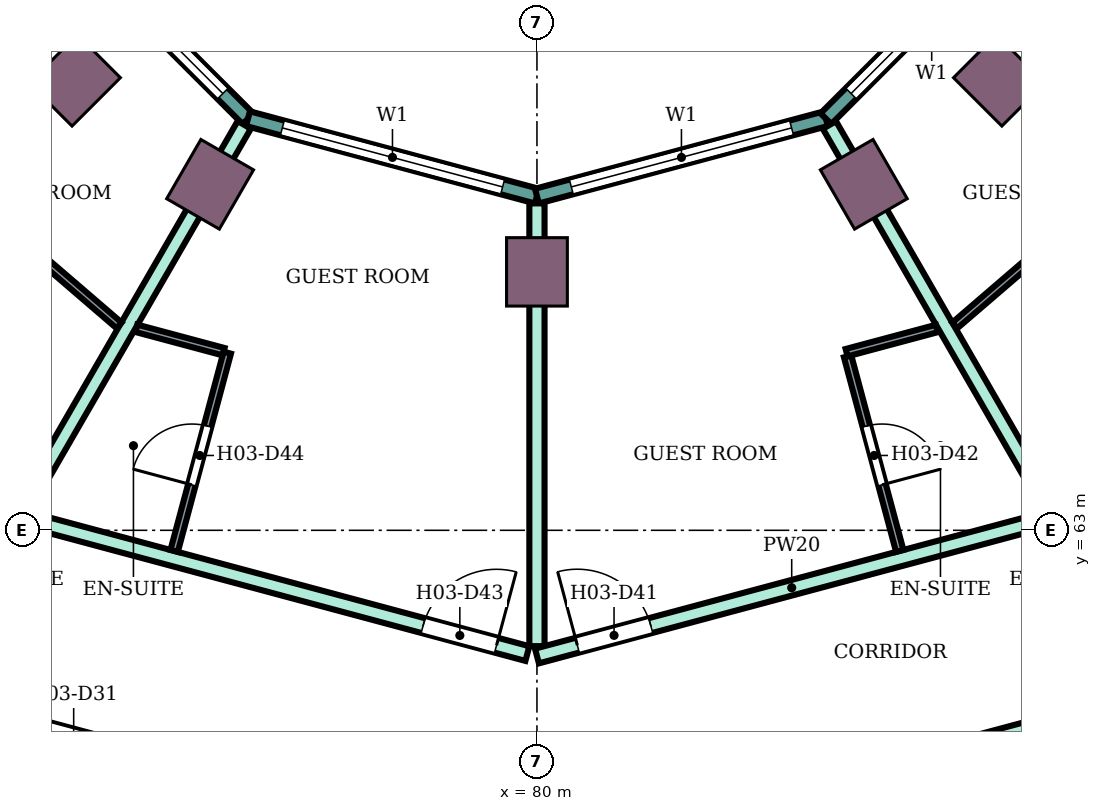
"""IFC4 building model, lengths in metres.
Left out: names, types, materials, properties, quantities, classifications, styles, units other than length and angle.
Written with IfcOpenShell. Run it as: python <this file> out.ifc"""

import sys

from ifc_helpers import new_model, si_unit, direction, frame, frame_2d, origin, origin_2d, place, context, subcontext, project, spatial, rectangle, extrude, element, fill, save


model = new_model("IFC4")
c1 = context("Model", 3, precision=1e-05, world=origin(), true_north=direction((0.0, 1.0)))
c2 = subcontext(c1, "Body", "Model", "MODEL_VIEW")
j1 = project(units=[si_unit("LENGTHUNIT", "METRE"), si_unit("PLANEANGLEUNIT", "RADIAN")], contexts=[c1])
p1 = place(None, origin())
s1 = spatial("IfcSite", under=j1, at=p1, CompositionType="ELEMENT")
p2 = place(p1, origin())
s2 = spatial("IfcBuilding", under=s1, at=p2, CompositionType="ELEMENT")
p3 = place(p2, frame((0.0, 0.0, 55.4)))
s3 = spatial("IfcBuildingStorey", under=s2, at=p3, CompositionType="ELEMENT", Elevation=55.4)
for number, where, z_axis, x_axis in (
    (1, (73.919, 68.919, 0.0), (0.0, 0.0, 1.0), (-0.707, -0.707, 0.0)),
    (2, (75.7, 67.552, 0.0), (0.0, 0.0, 1.0), (-0.5, -0.866, 0.0)),
    (3, (80.0, 66.4, 0.0), (0.0, 0.0, 1.0), (0.0, -1.0, 0.0)),
    (4, (84.3, 67.552, 0.0), (0.0, 0.0, 1.0), (0.5, -0.866, 0.0)),
    (5, (86.081, 68.919, 0.0), (0.0, 0.0, 1.0), (0.707, -0.707, 0.0)),
):
    element("IfcColumn", number, at=place(p3, frame(where, z_axis=z_axis, x_axis=x_axis)), inside=s3, PredefinedType="COLUMN", context=c2, shape_type="SweptSolid", body=[
        extrude(rectangle(XDim=0.9, YDim=0.8, at=origin_2d()), origin(), (0.0, 0.0, 1.0), 3.8),
    ])
p4 = place(p3, frame((73.415, 71.198, 0.0), z_axis=(0.0, 0.0, 1.0), x_axis=(0.707106781187, -0.707106781187, 0.0)))
e6 = element("IfcWall", 6, at=p4, inside=s3, PredefinedType="NOTDEFINED", context=c2, shape_type="SweptSolid", body=[
    extrude(rectangle(XDim=3.936, YDim=0.2, at=frame_2d((1.968, 0.0))), origin(), (0.0, 0.0, 1.0), 3.8),
])
p5 = place(p4, frame((0.468, 0.0, 0.9)))
e7 = element("IfcOpeningElement", 7, at=p5, cuts=e6, PredefinedType="OPENING", context=c2, shape_type="SweptSolid", body=[
    extrude(rectangle(XDim=3.0, YDim=2.3, at=frame_2d((1.5, 1.15))), frame((0.0, 0.11, 0.0), z_axis=(0.0, -1.0, 0.0), x_axis=(1.0, 0.0, 0.0)), (0.0, 0.0, 1.0), 0.22),
])
p6 = place(p3, frame((76.198, 68.415, 0.0), z_axis=(0.0, 0.0, 1.0), x_axis=(0.965933654434, -0.258789828301, 0.0)))
e8 = element("IfcWall", 8, at=p6, inside=s3, PredefinedType="NOTDEFINED", context=c2, shape_type="SweptSolid", body=[
    extrude(rectangle(XDim=3.936, YDim=0.2, at=frame_2d((1.968, 0.0))), origin(), (0.0, 0.0, 1.0), 3.8),
])
p7 = place(p6, frame((0.468, 0.0, 0.9)))
e9 = element("IfcOpeningElement", 9, at=p7, cuts=e8, PredefinedType="OPENING", context=c2, shape_type="SweptSolid", body=[
    extrude(rectangle(XDim=3.0, YDim=2.3, at=frame_2d((1.5, 1.15))), frame((0.0, 0.11, 0.0), z_axis=(0.0, -1.0, 0.0), x_axis=(1.0, 0.0, 0.0)), (0.0, 0.0, 1.0), 0.22),
])
p8 = place(p3, frame((80.0, 67.396, 0.0), z_axis=(0.0, 0.0, 1.0), x_axis=(0.965933654434, 0.258789828301, 0.0)))
e10 = element("IfcWall", 10, at=p8, inside=s3, PredefinedType="NOTDEFINED", context=c2, shape_type="SweptSolid", body=[
    extrude(rectangle(XDim=3.936, YDim=0.2, at=frame_2d((1.968, 0.0))), origin(), (0.0, 0.0, 1.0), 3.8),
])
p9 = place(p8, frame((0.468, 0.0, 0.9)))
e11 = element("IfcOpeningElement", 11, at=p9, cuts=e10, PredefinedType="OPENING", context=c2, shape_type="SweptSolid", body=[
    extrude(rectangle(XDim=3.0, YDim=2.3, at=frame_2d((1.5, 1.15))), frame((0.0, 0.11, 0.0), z_axis=(0.0, -1.0, 0.0), x_axis=(1.0, 0.0, 0.0)), (0.0, 0.0, 1.0), 0.22),
])
p10 = place(p3, frame((83.802, 68.415, 0.0), z_axis=(0.0, 0.0, 1.0), x_axis=(0.707106781187, 0.707106781187, 0.0)))
e12 = element("IfcWall", 12, at=p10, inside=s3, PredefinedType="NOTDEFINED", context=c2, shape_type="SweptSolid", body=[
    extrude(rectangle(XDim=3.936, YDim=0.2, at=frame_2d((1.968, 0.0))), origin(), (0.0, 0.0, 1.0), 3.8),
])
p11 = place(p10, frame((0.468, 0.0, 0.9)))
e13 = element("IfcOpeningElement", 13, at=p11, cuts=e12, PredefinedType="OPENING", context=c2, shape_type="SweptSolid", body=[
    extrude(rectangle(XDim=3.0, YDim=2.3, at=frame_2d((1.5, 1.15))), frame((0.0, 0.11, 0.0), z_axis=(0.0, -1.0, 0.0), x_axis=(1.0, 0.0, 0.0)), (0.0, 0.0, 1.0), 0.22),
])
p12 = place(p3, frame((71.877, 60.831, 0.0), z_axis=(0.0, 0.0, 1.0), x_axis=(0.965852509869, -0.259092510851, 0.0)))
e14 = element("IfcWall", 14, at=p12, inside=s3, PredefinedType="PARTITIONING", context=c2, shape_type="SweptSolid", body=[
    extrude(rectangle(XDim=8.32, YDim=0.2, at=frame_2d((4.16, 0.0))), origin(), (0.0, 0.0, 1.0), 3.35),
])
p13 = place(p12, frame((6.86, 0.0, 0.0)))
e15 = element("IfcOpeningElement", 15, at=p13, cuts=e14, PredefinedType="OPENING", context=c2, shape_type="SweptSolid", body=[
    extrude(rectangle(XDim=1.0, YDim=2.1, at=frame_2d((0.5, 1.05))), frame((0.0, 0.11, 0.0), z_axis=(0.0, -1.0, 0.0), x_axis=(1.0, 0.0, 0.0)), (0.0, 0.0, 1.0), 0.22),
])
p14 = place(p12, frame((1.6, 0.0, 0.0)))
e16 = element("IfcOpeningElement", 16, at=p14, cuts=e14, PredefinedType="OPENING", context=c2, shape_type="SweptSolid", body=[
    extrude(rectangle(XDim=1.0, YDim=2.1, at=frame_2d((0.5, 1.05))), frame((0.0, 0.11, 0.0), z_axis=(0.0, -1.0, 0.0), x_axis=(1.0, 0.0, 0.0)), (0.0, 0.0, 1.0), 0.22),
])
p15 = place(p3, frame((73.297, 63.143, 0.0), z_axis=(0.0, 0.0, 1.0), x_axis=(0.965859030528, -0.25906820173, 0.0)))
e17 = element("IfcWall", 17, at=p15, inside=s3, PredefinedType="PARTITIONING", context=c2, shape_type="SweptSolid", body=[
    extrude(rectangle(XDim=6.81, YDim=0.2, at=frame_2d((3.405, 0.0))), origin(), (0.0, 0.0, 1.0), 3.35),
])
p16 = place(p15, frame((5.39, 0.0, 0.0)))
e18 = element("IfcOpeningElement", 18, at=p16, cuts=e17, PredefinedType="OPENING", context=c2, shape_type="SweptSolid", body=[
    extrude(rectangle(XDim=1.0, YDim=2.1, at=frame_2d((0.5, 1.05))), frame((0.0, 0.11, 0.0), z_axis=(0.0, -1.0, 0.0), x_axis=(1.0, 0.0, 0.0)), (0.0, 0.0, 1.0), 0.22),
])
p17 = place(p3, frame((73.17, 63.177, 0.0), z_axis=(0.0, 0.0, 1.0), x_axis=(0.500239348149, 0.865887171959, 0.0)))
e19 = element("IfcWall", 19, at=p17, inside=s3, PredefinedType="PARTITIONING", context=c2, shape_type="SweptSolid", body=[
    extrude(rectangle(XDim=5.955, YDim=0.2, at=frame_2d((2.978, 0.0))), origin(), (0.0, 0.0, 1.0), 3.35),
])
p18 = place(p3, frame((80.0, 58.655, 0.0), z_axis=(0.0, 0.0, 1.0), x_axis=(0.965974635626, 0.258636817424, 0.0)))
e20 = element("IfcWall", 20, at=p18, inside=s3, PredefinedType="PARTITIONING", context=c2, shape_type="SweptSolid", body=[
    extrude(rectangle(XDim=8.36, YDim=0.2, at=frame_2d((4.18, 0.0))), origin(), (0.0, 0.0, 1.0), 3.35),
])
p19 = place(p18, frame((6.86, 0.0, 0.0)))
e21 = element("IfcOpeningElement", 21, at=p19, cuts=e20, PredefinedType="OPENING", context=c2, shape_type="SweptSolid", body=[
    extrude(rectangle(XDim=1.0, YDim=2.1, at=frame_2d((0.5, 1.05))), frame((0.0, 0.11, 0.0), z_axis=(0.0, -1.0, 0.0), x_axis=(1.0, 0.0, 0.0)), (0.0, 0.0, 1.0), 0.22),
])
p20 = place(p18, frame((0.55, 0.0, 0.0)))
e22 = element("IfcOpeningElement", 22, at=p20, cuts=e20, PredefinedType="OPENING", context=c2, shape_type="SweptSolid", body=[
    extrude(rectangle(XDim=1.0, YDim=2.1, at=frame_2d((0.5, 1.05))), frame((0.0, 0.11, 0.0), z_axis=(0.0, -1.0, 0.0), x_axis=(1.0, 0.0, 0.0)), (0.0, 0.0, 1.0), 0.22),
])
p21 = place(p3, frame((80.0, 61.476, 0.0), z_axis=(0.0, 0.0, 1.0), x_axis=(0.0, 1.0, 0.0)))
e23 = element("IfcWall", 23, at=p21, inside=s3, PredefinedType="PARTITIONING", context=c2, shape_type="SweptSolid", body=[
    extrude(rectangle(XDim=5.825, YDim=0.2, at=frame_2d((2.913, 0.0))), origin(), (0.0, 0.0, 1.0), 3.35),
])
p22 = place(p3, frame((80.0, 61.346, 0.0), z_axis=(0.0, 0.0, 1.0), x_axis=(0.965924181808, 0.258825182312, 0.0)))
e24 = element("IfcWall", 24, at=p22, inside=s3, PredefinedType="PARTITIONING", context=c2, shape_type="SweptSolid", body=[
    extrude(rectangle(XDim=6.94, YDim=0.2, at=frame_2d((3.47, 0.0))), origin(), (0.0, 0.0, 1.0), 3.35),
])
p23 = place(p22, frame((0.55, 0.0, 0.0)))
e25 = element("IfcOpeningElement", 25, at=p23, cuts=e24, PredefinedType="OPENING", context=c2, shape_type="SweptSolid", body=[
    extrude(rectangle(XDim=1.0, YDim=2.1, at=frame_2d((0.5, 1.05))), frame((0.0, 0.11, 0.0), z_axis=(0.0, -1.0, 0.0), x_axis=(1.0, 0.0, 0.0)), (0.0, 0.0, 1.0), 0.22),
])
p24 = place(p3, frame((83.848, 68.332, 0.0), z_axis=(0.0, 0.0, 1.0), x_axis=(0.499901724708, -0.866082135617, 0.0)))
e26 = element("IfcWall", 26, at=p24, inside=s3, PredefinedType="PARTITIONING", context=c2, shape_type="SweptSolid", body=[
    extrude(rectangle(XDim=5.855, YDim=0.2, at=frame_2d((2.928, 0.0))), origin(), (0.0, 0.0, 1.0), 3.35),
])
p25 = place(p3, frame((73.357, 66.681, 0.0), z_axis=(0.0, 0.0, 1.0), x_axis=(0.758263469747, -0.651948242154, 0.0)))
e27 = element("IfcWall", 27, at=p25, inside=s3, PredefinedType="PARTITIONING", context=c2, shape_type="SweptSolid", body=[
    extrude(rectangle(XDim=1.511, YDim=0.1, at=frame_2d((0.755, 0.0))), origin(), (0.0, 0.0, 1.0), 3.35),
])
p26 = place(p3, frame((74.729, 65.657, 0.0), z_axis=(0.0, 0.0, 1.0), x_axis=(0.965948051503, -0.258736085224, 0.0)))
e28 = element("IfcWall", 28, at=p26, inside=s3, PredefinedType="PARTITIONING", context=c2, shape_type="SweptSolid", body=[
    extrude(rectangle(XDim=1.189, YDim=0.1, at=frame_2d((0.594, 0.0))), origin(), (0.0, 0.0, 1.0), 3.35),
])
p27 = place(p3, frame((75.227, 62.729, 0.0), z_axis=(0.0, 0.0, 1.0), x_axis=(0.258945475746, 0.965891940432, 0.0)))
e29 = element("IfcWall", 29, at=p27, inside=s3, PredefinedType="PARTITIONING", context=c2, shape_type="SweptSolid", body=[
    extrude(rectangle(XDim=2.7, YDim=0.1, at=frame_2d((1.35, 0.0))), origin(), (0.0, 0.0, 1.0), 3.35),
])
p28 = place(p27, frame((0.9, 0.0, 0.0)))
e30 = element("IfcOpeningElement", 30, at=p28, cuts=e29, PredefinedType="OPENING", context=c2, shape_type="SweptSolid", body=[
    extrude(rectangle(XDim=0.8, YDim=2.1, at=frame_2d((0.4, 1.05))), frame((0.0, 0.06, 0.0), z_axis=(0.0, -1.0, 0.0), x_axis=(1.0, 0.0, 0.0)), (0.0, 0.0, 1.0), 0.12),
])
p29 = place(p3, frame((84.087, 65.289, 0.0), z_axis=(0.0, 0.0, 1.0), x_axis=(0.258929459649, -0.965896234037, 0.0)))
e31 = element("IfcWall", 31, at=p29, inside=s3, PredefinedType="PARTITIONING", context=c2, shape_type="SweptSolid", body=[
    extrude(rectangle(XDim=2.65, YDim=0.1, at=frame_2d((1.325, 0.0))), origin(), (0.0, 0.0, 1.0), 3.35),
])
p30 = place(p29, frame((0.95, 0.0, 0.0)))
e32 = element("IfcOpeningElement", 32, at=p30, cuts=e31, PredefinedType="OPENING", context=c2, shape_type="SweptSolid", body=[
    extrude(rectangle(XDim=0.8, YDim=2.1, at=frame_2d((0.4, 1.05))), frame((0.0, 0.06, 0.0), z_axis=(0.0, -1.0, 0.0), x_axis=(1.0, 0.0, 0.0)), (0.0, 0.0, 1.0), 0.12),
])
p31 = place(p3, frame((84.074, 65.337, 0.0), z_axis=(0.0, 0.0, 1.0), x_axis=(0.965914351064, 0.258861867428, 0.0)))
e33 = element("IfcWall", 33, at=p31, inside=s3, PredefinedType="PARTITIONING", context=c2, shape_type="SweptSolid", body=[
    extrude(rectangle(XDim=1.229, YDim=0.1, at=frame_2d((0.615, 0.0))), origin(), (0.0, 0.0, 1.0), 3.35),
])
p32 = place(p3, frame((85.497, 65.696, 0.0), z_axis=(0.0, 0.0, 1.0), x_axis=(0.75817032582, 0.652056559698, 0.0)))
e34 = element("IfcWall", 34, at=p32, inside=s3, PredefinedType="PARTITIONING", context=c2, shape_type="SweptSolid", body=[
    extrude(rectangle(XDim=1.461, YDim=0.1, at=frame_2d((0.73, 0.0))), origin(), (0.0, 0.0, 1.0), 3.35),
])
p33 = place(p5, origin())
e35 = element("IfcWindow", 35, at=p33, inside=s3, PartitioningType="SINGLE_PANEL", PredefinedType="WINDOW", context=c2, shape_type="SweptSolid", body=[
    extrude(rectangle(XDim=3.0, YDim=2.3, at=frame_2d((1.5, 1.15))), frame((0.0, 0.03, 0.0), z_axis=(0.0, -1.0, 0.0), x_axis=(1.0, 0.0, 0.0)), (0.0, 0.0, 1.0), 0.06),
])
fill(e7, e35)
p34 = place(p7, origin())
e36 = element("IfcWindow", 36, at=p34, inside=s3, PartitioningType="SINGLE_PANEL", PredefinedType="WINDOW", context=c2, shape_type="SweptSolid", body=[
    extrude(rectangle(XDim=3.0, YDim=2.3, at=frame_2d((1.5, 1.15))), frame((0.0, 0.03, 0.0), z_axis=(0.0, -1.0, 0.0), x_axis=(1.0, 0.0, 0.0)), (0.0, 0.0, 1.0), 0.06),
])
fill(e9, e36)
p35 = place(p9, origin())
e37 = element("IfcWindow", 37, at=p35, inside=s3, PartitioningType="SINGLE_PANEL", PredefinedType="WINDOW", context=c2, shape_type="SweptSolid", body=[
    extrude(rectangle(XDim=3.0, YDim=2.3, at=frame_2d((1.5, 1.15))), frame((0.0, 0.03, 0.0), z_axis=(0.0, -1.0, 0.0), x_axis=(1.0, 0.0, 0.0)), (0.0, 0.0, 1.0), 0.06),
])
fill(e11, e37)
p36 = place(p11, origin())
e38 = element("IfcWindow", 38, at=p36, inside=s3, PartitioningType="SINGLE_PANEL", PredefinedType="WINDOW", context=c2, shape_type="SweptSolid", body=[
    extrude(rectangle(XDim=3.0, YDim=2.3, at=frame_2d((1.5, 1.15))), frame((0.0, 0.03, 0.0), z_axis=(0.0, -1.0, 0.0), x_axis=(1.0, 0.0, 0.0)), (0.0, 0.0, 1.0), 0.06),
])
fill(e13, e38)
p37 = place(p14, frame((1.0, 0.0, 0.0), z_axis=(0.0, 0.0, 1.0), x_axis=(-1.0, 0.0, 0.0)))
e39 = element("IfcDoor", 39, at=p37, inside=s3, OperationType="SINGLE_SWING_LEFT", PredefinedType="DOOR", context=c2, shape_type="SweptSolid", body=[
    extrude(rectangle(XDim=1.0, YDim=2.1, at=frame_2d((0.5, 1.05))), frame((0.0, 0.025, 0.0), z_axis=(0.0, -1.0, 0.0), x_axis=(1.0, 0.0, 0.0)), (0.0, 0.0, 1.0), 0.05),
])
fill(e16, e39)
p38 = place(p23, origin())
e40 = element("IfcDoor", 40, at=p38, inside=s3, OperationType="SINGLE_SWING_LEFT", PredefinedType="DOOR", context=c2, shape_type="SweptSolid", body=[
    extrude(rectangle(XDim=1.0, YDim=2.1, at=frame_2d((0.5, 1.05))), frame((0.0, 0.025, 0.0), z_axis=(0.0, -1.0, 0.0), x_axis=(1.0, 0.0, 0.0)), (0.0, 0.0, 1.0), 0.05),
])
fill(e25, e40)
p39 = place(p30, origin())
e41 = element("IfcDoor", 41, at=p39, inside=s3, OperationType="SINGLE_SWING_RIGHT", PredefinedType="DOOR", context=c2, shape_type="SweptSolid", body=[
    extrude(rectangle(XDim=0.8, YDim=2.1, at=frame_2d((0.4, 1.05))), frame((0.0, 0.025, 0.0), z_axis=(0.0, -1.0, 0.0), x_axis=(1.0, 0.0, 0.0)), (0.0, 0.0, 1.0), 0.05),
])
fill(e32, e41)
p40 = place(p16, origin())
e42 = element("IfcDoor", 42, at=p40, inside=s3, OperationType="SINGLE_SWING_RIGHT", PredefinedType="DOOR", context=c2, shape_type="SweptSolid", body=[
    extrude(rectangle(XDim=1.0, YDim=2.1, at=frame_2d((0.5, 1.05))), frame((0.0, 0.025, 0.0), z_axis=(0.0, -1.0, 0.0), x_axis=(1.0, 0.0, 0.0)), (0.0, 0.0, 1.0), 0.05),
])
fill(e18, e42)
p41 = place(p28, origin())
e43 = element("IfcDoor", 43, at=p41, inside=s3, OperationType="SINGLE_SWING_LEFT", PredefinedType="DOOR", context=c2, shape_type="SweptSolid", body=[
    extrude(rectangle(XDim=0.8, YDim=2.1, at=frame_2d((0.4, 1.05))), frame((0.0, 0.025, 0.0), z_axis=(0.0, -1.0, 0.0), x_axis=(1.0, 0.0, 0.0)), (0.0, 0.0, 1.0), 0.05),
])
fill(e30, e43)
save(model, sys.argv[1])
